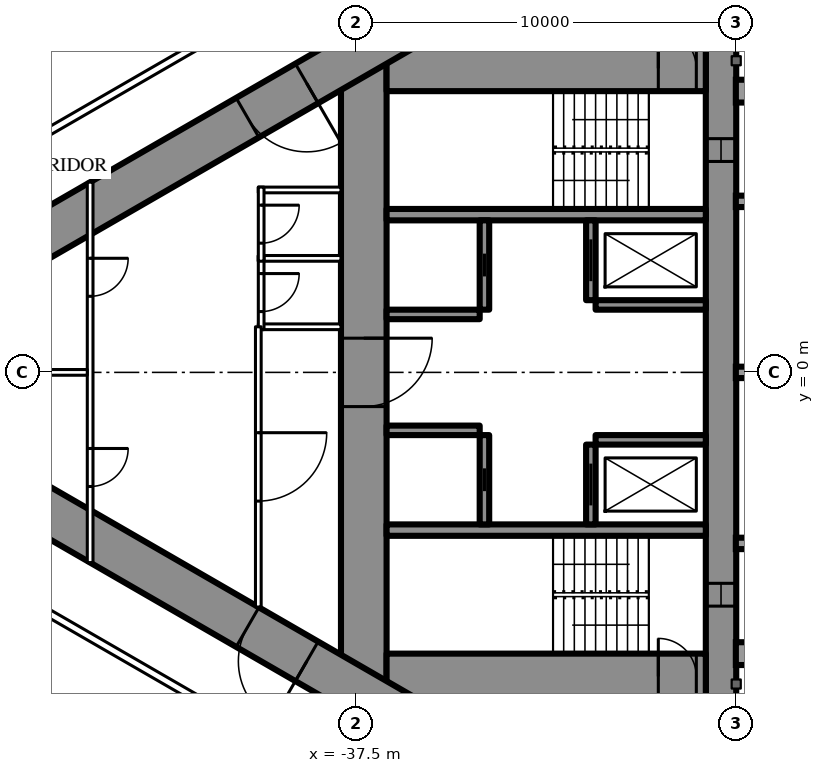
"""IFC4 building model, lengths in metres.
Left out: names, types, materials, properties, quantities, classifications, styles, units other than length and angle.
Written with IfcOpenShell. Run it as: python <this file> out.ifc"""

import sys

from ifc_helpers import new_model, si_unit, direction, frame, frame_2d, origin, place, context, subcontext, project, spatial, rectangle, extrude, element, fill, save


model = new_model("IFC4")
c1 = context("Model", 3, precision=1e-05, world=origin(), true_north=direction((0.0, 1.0)))
c2 = subcontext(c1, "Body", "Model", "MODEL_VIEW")
j1 = project(units=[si_unit("LENGTHUNIT", "METRE"), si_unit("PLANEANGLEUNIT", "RADIAN")], contexts=[c1])
p1 = place(None, origin())
s1 = spatial("IfcSite", under=j1, at=p1, CompositionType="ELEMENT")
p2 = place(p1, origin())
s2 = spatial("IfcBuilding", under=s1, at=p2, CompositionType="ELEMENT")
p3 = place(p2, frame((0.0, 0.0, 70.5)))
s3 = spatial("IfcBuildingStorey", under=s2, at=p3, CompositionType="ELEMENT", Elevation=70.5)
p4 = place(p3, frame((-27.9, 8.6, 0.0), z_axis=(0.0, 0.0, 1.0), x_axis=(0.0, -1.0, 0.0)))
e1 = element("IfcWall", 1, at=p4, inside=s3, PredefinedType="SHEAR", context=c2, shape_type="SweptSolid", body=[
    extrude(rectangle(XDim=17.2, YDim=0.8, at=frame_2d((8.6, 0.0))), origin(), (0.0, 0.0, 1.0), 3.5),
])
p5 = place(p4, frame((2.45, 0.0, 0.6)))
e2 = element("IfcOpeningElement", 2, at=p5, cuts=e1, PredefinedType="OPENING", context=c2, shape_type="SweptSolid", body=[
    extrude(rectangle(XDim=0.6, YDim=2.1, at=frame_2d((0.3, 1.05))), frame((0.0, 0.41, 0.0), z_axis=(0.0, -1.0, 0.0), x_axis=(1.0, 0.0, 0.0)), (0.0, 0.0, 1.0), 0.82),
])
p6 = place(p4, frame((14.15, 0.0, 0.6)))
e3 = element("IfcOpeningElement", 3, at=p6, cuts=e1, PredefinedType="OPENING", context=c2, shape_type="SweptSolid", body=[
    extrude(rectangle(XDim=0.6, YDim=2.1, at=frame_2d((0.3, 1.05))), frame((0.0, 0.41, 0.0), z_axis=(0.0, -1.0, 0.0), x_axis=(1.0, 0.0, 0.0)), (0.0, 0.0, 1.0), 0.82),
])
p7 = place(p3, frame((-37.3, 8.6, 0.0), z_axis=(0.0, 0.0, 1.0), x_axis=(0.0, -1.0, 0.0)))
e4 = element("IfcWall", 4, at=p7, inside=s3, PredefinedType="SHEAR", context=c2, shape_type="SweptSolid", body=[
    extrude(rectangle(XDim=17.2, YDim=1.2, at=frame_2d((8.6, 0.0))), origin(), (0.0, 0.0, 1.0), 3.5),
])
p8 = place(p7, frame((7.7, 0.0, 0.0)))
e5 = element("IfcOpeningElement", 5, at=p8, cuts=e4, PredefinedType="OPENING", context=c2, shape_type="SweptSolid", body=[
    extrude(rectangle(XDim=1.8, YDim=2.2, at=frame_2d((0.9, 1.1))), frame((0.0, 0.61, 0.0), z_axis=(0.0, -1.0, 0.0), x_axis=(1.0, 0.0, 0.0)), (0.0, 0.0, 1.0), 1.22),
])
p9 = place(p3, frame((-28.3, 8.0, 0.0), z_axis=(0.0, 0.0, 1.0), x_axis=(-1.0, 0.0, 0.0)))
e6 = element("IfcWall", 6, at=p9, inside=s3, PredefinedType="SHEAR", context=c2, shape_type="SweptSolid", body=[
    extrude(rectangle(XDim=8.4, YDim=1.2, at=frame_2d((4.2, 0.0))), origin(), (0.0, 0.0, 1.0), 3.5),
])
p10 = place(p9, frame((0.25, 0.0, 0.0)))
e7 = element("IfcOpeningElement", 7, at=p10, cuts=e6, PredefinedType="OPENING", context=c2, shape_type="SweptSolid", body=[
    extrude(rectangle(XDim=1.0, YDim=2.2, at=frame_2d((0.5, 1.1))), frame((0.0, 0.61, 0.0), z_axis=(0.0, -1.0, 0.0), x_axis=(1.0, 0.0, 0.0)), (0.0, 0.0, 1.0), 1.22),
])
p11 = place(p3, frame((-28.3, -8.0, 0.0), z_axis=(0.0, 0.0, 1.0), x_axis=(-1.0, 0.0, 0.0)))
e8 = element("IfcWall", 8, at=p11, inside=s3, PredefinedType="SHEAR", context=c2, shape_type="SweptSolid", body=[
    extrude(rectangle(XDim=8.4, YDim=1.2, at=frame_2d((4.2, 0.0))), origin(), (0.0, 0.0, 1.0), 3.5),
])
p12 = place(p11, frame((0.25, 0.0, 0.0)))
e9 = element("IfcOpeningElement", 9, at=p12, cuts=e8, PredefinedType="OPENING", context=c2, shape_type="SweptSolid", body=[
    extrude(rectangle(XDim=1.0, YDim=2.2, at=frame_2d((0.5, 1.1))), frame((0.0, 0.61, 0.0), z_axis=(0.0, -1.0, 0.0), x_axis=(1.0, 0.0, 0.0)), (0.0, 0.0, 1.0), 1.22),
])
for number, where, z_axis, x_axis in (
    (10, (-28.3, 4.15, 0.0), (0.0, 0.0, 1.0), (-1.0, 0.0, 0.0)),
    (11, (-28.3, -4.15, 0.0), (0.0, 0.0, 1.0), (-1.0, 0.0, 0.0)),
):
    element("IfcWall", number, at=place(p3, frame(where, z_axis=z_axis, x_axis=x_axis)), inside=s3, PredefinedType="SHEAR", context=c2, shape_type="SweptSolid", body=[
        extrude(rectangle(XDim=8.4, YDim=0.3, at=frame_2d((4.2, 0.0))), origin(), (0.0, 0.0, 1.0), 3.5),
    ])
p13 = place(p3, frame((-31.325, 4.0, 0.0), z_axis=(0.0, 0.0, 1.0), x_axis=(0.0, -1.0, 0.0)))
e12 = element("IfcWall", 12, at=p13, inside=s3, PredefinedType="SHEAR", context=c2, shape_type="SweptSolid", body=[
    extrude(rectangle(XDim=2.1, YDim=0.25, at=frame_2d((1.05, 0.0))), origin(), (0.0, 0.0, 1.0), 3.5),
])
p14 = place(p13, frame((0.5, 0.0, 0.0)))
e13 = element("IfcOpeningElement", 13, at=p14, cuts=e12, PredefinedType="OPENING", context=c2, shape_type="SweptSolid", body=[
    extrude(rectangle(XDim=1.1, YDim=2.2, at=frame_2d((0.55, 1.1))), frame((0.0, 0.135, 0.0), z_axis=(0.0, -1.0, 0.0), x_axis=(1.0, 0.0, 0.0)), (0.0, 0.0, 1.0), 0.27),
])
p15 = place(p3, frame((-34.125, 4.0, 0.0), z_axis=(0.0, 0.0, 1.0), x_axis=(0.0, -1.0, 0.0)))
e14 = element("IfcWall", 14, at=p15, inside=s3, PredefinedType="SHEAR", context=c2, shape_type="SweptSolid", body=[
    extrude(rectangle(XDim=2.35, YDim=0.25, at=frame_2d((1.175, 0.0))), origin(), (0.0, 0.0, 1.0), 3.5),
])
p16 = place(p15, frame((0.875, 0.0, 0.0)))
e15 = element("IfcOpeningElement", 15, at=p16, cuts=e14, PredefinedType="OPENING", context=c2, shape_type="SweptSolid", body=[
    extrude(rectangle(XDim=0.6, YDim=2.0, at=frame_2d((0.3, 1.0))), frame((0.0, 0.135, 0.0), z_axis=(0.0, -1.0, 0.0), x_axis=(1.0, 0.0, 0.0)), (0.0, 0.0, 1.0), 0.27),
])
p17 = place(p3, frame((-28.3, 1.775, 0.0), z_axis=(0.0, 0.0, 1.0), x_axis=(-1.0, 0.0, 0.0)))
e16 = element("IfcWall", 16, at=p17, inside=s3, PredefinedType="SHEAR", context=c2, shape_type="SweptSolid", body=[
    extrude(rectangle(XDim=2.9, YDim=0.25, at=frame_2d((1.45, 0.0))), origin(), (0.0, 0.0, 1.0), 3.5),
])
p18 = place(p3, frame((-34.25, 1.525, 0.0), z_axis=(0.0, 0.0, 1.0), x_axis=(-1.0, 0.0, 0.0)))
e17 = element("IfcWall", 17, at=p18, inside=s3, PredefinedType="SHEAR", context=c2, shape_type="SweptSolid", body=[
    extrude(rectangle(XDim=2.45, YDim=0.25, at=frame_2d((1.225, 0.0))), origin(), (0.0, 0.0, 1.0), 3.5),
])
p19 = place(p3, frame((-31.325, -1.9, 0.0), z_axis=(0.0, 0.0, 1.0), x_axis=(0.0, -1.0, 0.0)))
e18 = element("IfcWall", 18, at=p19, inside=s3, PredefinedType="SHEAR", context=c2, shape_type="SweptSolid", body=[
    extrude(rectangle(XDim=2.1, YDim=0.25, at=frame_2d((1.05, 0.0))), origin(), (0.0, 0.0, 1.0), 3.5),
])
p20 = place(p19, frame((0.5, 0.0, 0.0)))
e19 = element("IfcOpeningElement", 19, at=p20, cuts=e18, PredefinedType="OPENING", context=c2, shape_type="SweptSolid", body=[
    extrude(rectangle(XDim=1.1, YDim=2.2, at=frame_2d((0.55, 1.1))), frame((0.0, 0.135, 0.0), z_axis=(0.0, -1.0, 0.0), x_axis=(1.0, 0.0, 0.0)), (0.0, 0.0, 1.0), 0.27),
])
p21 = place(p3, frame((-34.125, -1.65, 0.0), z_axis=(0.0, 0.0, 1.0), x_axis=(0.0, -1.0, 0.0)))
e20 = element("IfcWall", 20, at=p21, inside=s3, PredefinedType="SHEAR", context=c2, shape_type="SweptSolid", body=[
    extrude(rectangle(XDim=2.35, YDim=0.25, at=frame_2d((1.175, 0.0))), origin(), (0.0, 0.0, 1.0), 3.5),
])
p22 = place(p21, frame((0.875, 0.0, 0.0)))
e21 = element("IfcOpeningElement", 21, at=p22, cuts=e20, PredefinedType="OPENING", context=c2, shape_type="SweptSolid", body=[
    extrude(rectangle(XDim=0.6, YDim=2.0, at=frame_2d((0.3, 1.0))), frame((0.0, 0.135, 0.0), z_axis=(0.0, -1.0, 0.0), x_axis=(1.0, 0.0, 0.0)), (0.0, 0.0, 1.0), 0.27),
])
p23 = place(p3, frame((-28.3, -1.775, 0.0), z_axis=(0.0, 0.0, 1.0), x_axis=(-1.0, 0.0, 0.0)))
e22 = element("IfcWall", 22, at=p23, inside=s3, PredefinedType="SHEAR", context=c2, shape_type="SweptSolid", body=[
    extrude(rectangle(XDim=2.9, YDim=0.25, at=frame_2d((1.45, 0.0))), origin(), (0.0, 0.0, 1.0), 3.5),
])
p24 = place(p3, frame((-34.25, -1.525, 0.0), z_axis=(0.0, 0.0, 1.0), x_axis=(-1.0, 0.0, 0.0)))
e23 = element("IfcWall", 23, at=p24, inside=s3, PredefinedType="SHEAR", context=c2, shape_type="SweptSolid", body=[
    extrude(rectangle(XDim=2.45, YDim=0.25, at=frame_2d((1.225, 0.0))), origin(), (0.0, 0.0, 1.0), 3.5),
])
p25 = place(p3, frame((-27.2, 14.3, 0.0), z_axis=(0.0, 0.0, 1.0), x_axis=(-0.866026593062, -0.499997940104, 0.0)))
e24 = element("IfcWall", 24, at=p25, inside=s3, PredefinedType="SHEAR", context=c2, shape_type="SweptSolid", body=[
    extrude(rectangle(XDim=28.946, YDim=1.2, at=frame_2d((14.473, 0.0))), origin(), (0.0, 0.0, 1.0), 3.5),
])
p26 = place(p25, frame((4.6, 0.0, 0.0)))
e25 = element("IfcOpeningElement", 25, at=p26, cuts=e24, PredefinedType="OPENING", context=c2, shape_type="SweptSolid", body=[
    extrude(rectangle(XDim=1.0, YDim=2.2, at=frame_2d((0.5, 1.1))), frame((0.0, 0.61, 0.0), z_axis=(0.0, -1.0, 0.0), x_axis=(1.0, 0.0, 0.0)), (0.0, 0.0, 1.0), 1.22),
])
p27 = place(p25, frame((13.395, 0.0, 0.0)))
e26 = element("IfcOpeningElement", 26, at=p27, cuts=e24, PredefinedType="OPENING", context=c2, shape_type="SweptSolid", body=[
    extrude(rectangle(XDim=1.8, YDim=2.2, at=frame_2d((0.9, 1.1))), frame((0.0, 0.61, 0.0), z_axis=(0.0, -1.0, 0.0), x_axis=(1.0, 0.0, 0.0)), (0.0, 0.0, 1.0), 1.22),
])
p28 = place(p3, frame((-27.2, -14.3, 0.0), z_axis=(0.0, 0.0, 1.0), x_axis=(-0.866024021859, 0.500002393557, 0.0)))
e27 = element("IfcWall", 27, at=p28, inside=s3, PredefinedType="SHEAR", context=c2, shape_type="SweptSolid", body=[
    extrude(rectangle(XDim=27.907, YDim=1.2, at=frame_2d((13.954, 0.0))), origin(), (0.0, 0.0, 1.0), 3.5),
])
p29 = place(p28, frame((4.6, 0.0, 0.0)))
e28 = element("IfcOpeningElement", 28, at=p29, cuts=e27, PredefinedType="OPENING", context=c2, shape_type="SweptSolid", body=[
    extrude(rectangle(XDim=1.0, YDim=2.2, at=frame_2d((0.5, 1.1))), frame((0.0, 0.61, 0.0), z_axis=(0.0, -1.0, 0.0), x_axis=(1.0, 0.0, 0.0)), (0.0, 0.0, 1.0), 1.22),
])
p30 = place(p28, frame((13.395, 0.0, 0.0)))
e29 = element("IfcOpeningElement", 29, at=p30, cuts=e27, PredefinedType="OPENING", context=c2, shape_type="SweptSolid", body=[
    extrude(rectangle(XDim=1.8, YDim=2.2, at=frame_2d((0.9, 1.1))), frame((0.0, 0.61, 0.0), z_axis=(0.0, -1.0, 0.0), x_axis=(1.0, 0.0, 0.0)), (0.0, 0.0, 1.0), 1.22),
])
p31 = place(p3, frame((-36.92, -11.344, 0.0), z_axis=(0.0, 0.0, 1.0), x_axis=(-0.866028313256, 0.499994960614, 0.0)))
e30 = element("IfcWall", 30, at=p31, inside=s3, PredefinedType="PARTITIONING", context=c2, shape_type="SweptSolid", body=[
    extrude(rectangle(XDim=22.568, YDim=0.2, at=frame_2d((11.284, 0.0))), origin(), (0.0, 0.0, 1.0), 3.25),
])
p32 = place(p31, frame((20.958, 0.0, 0.0)))
e31 = element("IfcOpeningElement", 31, at=p32, cuts=e30, PredefinedType="OPENING", context=c2, shape_type="SweptSolid", body=[
    extrude(rectangle(XDim=0.95, YDim=2.2, at=frame_2d((0.475, 1.1))), frame((0.0, 0.11, 0.0), z_axis=(0.0, -1.0, 0.0), x_axis=(1.0, 0.0, 0.0)), (0.0, 0.0, 1.0), 0.22),
])
p33 = place(p31, frame((12.68, 0.0, 0.0)))
e32 = element("IfcOpeningElement", 32, at=p33, cuts=e30, PredefinedType="OPENING", context=c2, shape_type="SweptSolid", body=[
    extrude(rectangle(XDim=0.95, YDim=2.2, at=frame_2d((0.475, 1.1))), frame((0.0, 0.11, 0.0), z_axis=(0.0, -1.0, 0.0), x_axis=(1.0, 0.0, 0.0)), (0.0, 0.0, 1.0), 0.22),
])
p34 = place(p31, frame((3.35, 0.0, 0.0)))
e33 = element("IfcOpeningElement", 33, at=p34, cuts=e30, PredefinedType="OPENING", context=c2, shape_type="SweptSolid", body=[
    extrude(rectangle(XDim=1.0, YDim=2.2, at=frame_2d((0.5, 1.1))), frame((0.0, 0.11, 0.0), z_axis=(0.0, -1.0, 0.0), x_axis=(1.0, 0.0, 0.0)), (0.0, 0.0, 1.0), 0.22),
])
p35 = place(p3, frame((-37.7, 10.894, 0.0), z_axis=(0.0, 0.0, 1.0), x_axis=(-0.866024459167, -0.500001636122, 0.0)))
e34 = element("IfcWall", 34, at=p35, inside=s3, PredefinedType="PARTITIONING", context=c2, shape_type="SweptSolid", body=[
    extrude(rectangle(XDim=11.38, YDim=0.2, at=frame_2d((5.69, 0.0))), origin(), (0.0, 0.0, 1.0), 3.25),
])
p36 = place(p35, frame((0.6, 0.0, 0.0)))
e35 = element("IfcOpeningElement", 35, at=p36, cuts=e34, PredefinedType="OPENING", context=c2, shape_type="SweptSolid", body=[
    extrude(rectangle(XDim=0.95, YDim=2.2, at=frame_2d((0.475, 1.1))), frame((0.0, 0.11, 0.0), z_axis=(0.0, -1.0, 0.0), x_axis=(1.0, 0.0, 0.0)), (0.0, 0.0, 1.0), 0.22),
])
for number, where, z_axis, x_axis in (
    (36, (-37.9, 1.2, 0.0), (0.0, 0.0, 1.0), (-1.0, 0.0, 0.0)),
    (37, (-37.9, 3.0, 0.0), (0.0, 0.0, 1.0), (-1.0, 0.0, 0.0)),
    (38, (-37.9, 4.8, 0.0), (0.0, 0.0, 1.0), (-1.0, 0.0, 0.0)),
):
    element("IfcWall", number, at=place(p3, frame(where, z_axis=z_axis, x_axis=x_axis)), inside=s3, PredefinedType="PARTITIONING", context=c2, shape_type="SweptSolid", body=[
        extrude(rectangle(XDim=2.175, YDim=0.15, at=frame_2d((1.087, 0.0))), origin(), (0.0, 0.0, 1.0), 3.25),
    ])
p37 = place(p3, frame((-40.0, 3.075, 0.0), z_axis=(0.0, 0.0, 1.0), x_axis=(0.0, -1.0, 0.0)))
e39 = element("IfcWall", 39, at=p37, inside=s3, PredefinedType="PARTITIONING", context=c2, shape_type="SweptSolid", body=[
    extrude(rectangle(XDim=1.95, YDim=0.15, at=frame_2d((0.975, 0.0))), origin(), (0.0, 0.0, 1.0), 3.25),
])
p38 = place(p37, frame((0.475, 0.0, 0.0)))
e40 = element("IfcOpeningElement", 40, at=p38, cuts=e39, PredefinedType="OPENING", context=c2, shape_type="SweptSolid", body=[
    extrude(rectangle(XDim=1.0, YDim=2.2, at=frame_2d((0.5, 1.1))), frame((0.0, 0.085, 0.0), z_axis=(0.0, -1.0, 0.0), x_axis=(1.0, 0.0, 0.0)), (0.0, 0.0, 1.0), 0.17),
])
p39 = place(p3, frame((-40.0, 4.875, 0.0), z_axis=(0.0, 0.0, 1.0), x_axis=(0.0, -1.0, 0.0)))
e41 = element("IfcWall", 41, at=p39, inside=s3, PredefinedType="PARTITIONING", context=c2, shape_type="SweptSolid", body=[
    extrude(rectangle(XDim=1.95, YDim=0.15, at=frame_2d((0.975, 0.0))), origin(), (0.0, 0.0, 1.0), 3.25),
])
p40 = place(p39, frame((0.475, 0.0, 0.0)))
e42 = element("IfcOpeningElement", 42, at=p40, cuts=e41, PredefinedType="OPENING", context=c2, shape_type="SweptSolid", body=[
    extrude(rectangle(XDim=1.0, YDim=2.2, at=frame_2d((0.5, 1.1))), frame((0.0, 0.085, 0.0), z_axis=(0.0, -1.0, 0.0), x_axis=(1.0, 0.0, 0.0)), (0.0, 0.0, 1.0), 0.17),
])
p41 = place(p3, frame((-40.075, 1.2, 0.0), z_axis=(0.0, 0.0, 1.0), x_axis=(0.0, -1.0, 0.0)))
e43 = element("IfcWall", 43, at=p41, inside=s3, PredefinedType="PARTITIONING", context=c2, shape_type="SweptSolid", body=[
    extrude(rectangle(XDim=7.374, YDim=0.15, at=frame_2d((3.687, 0.0))), origin(), (0.0, 0.0, 1.0), 3.25),
])
p42 = place(p41, frame((2.787, 0.0, 0.0)))
e44 = element("IfcOpeningElement", 44, at=p42, cuts=e43, PredefinedType="OPENING", context=c2, shape_type="SweptSolid", body=[
    extrude(rectangle(XDim=1.8, YDim=2.2, at=frame_2d((0.9, 1.1))), frame((0.0, 0.085, 0.0), z_axis=(0.0, -1.0, 0.0), x_axis=(1.0, 0.0, 0.0)), (0.0, 0.0, 1.0), 0.17),
])
p43 = place(p3, frame((-44.5, 5.005, 0.0), z_axis=(0.0, 0.0, 1.0), x_axis=(0.0, -1.0, 0.0)))
e45 = element("IfcWall", 45, at=p43, inside=s3, PredefinedType="PARTITIONING", context=c2, shape_type="SweptSolid", body=[
    extrude(rectangle(XDim=10.009, YDim=0.15, at=frame_2d((5.005, 0.0))), origin(), (0.0, 0.0, 1.0), 2.45),
])
p44 = place(p43, frame((2.002, 0.0, 0.0)))
e46 = element("IfcOpeningElement", 46, at=p44, cuts=e45, PredefinedType="OPENING", context=c2, shape_type="SweptSolid", body=[
    extrude(rectangle(XDim=1.0, YDim=2.2, at=frame_2d((0.5, 1.1))), frame((0.0, 0.085, 0.0), z_axis=(0.0, -1.0, 0.0), x_axis=(1.0, 0.0, 0.0)), (0.0, 0.0, 1.0), 0.17),
])
p45 = place(p43, frame((7.007, 0.0, 0.0)))
e47 = element("IfcOpeningElement", 47, at=p45, cuts=e45, PredefinedType="OPENING", context=c2, shape_type="SweptSolid", body=[
    extrude(rectangle(XDim=1.0, YDim=2.2, at=frame_2d((0.5, 1.1))), frame((0.0, 0.085, 0.0), z_axis=(0.0, -1.0, 0.0), x_axis=(1.0, 0.0, 0.0)), (0.0, 0.0, 1.0), 0.17),
])
p46 = place(p3, frame((-44.575, 0.0, 0.0), z_axis=(0.0, 0.0, 1.0), x_axis=(-1.0, 0.0, 0.0)))
e48 = element("IfcWall", 48, at=p46, inside=s3, PredefinedType="PARTITIONING", context=c2, shape_type="SweptSolid", body=[
    extrude(rectangle(XDim=8.593, YDim=0.15, at=frame_2d((4.297, 0.0))), origin(), (0.0, 0.0, 1.0), 2.25),
])
p47 = place(p38, origin())
e49 = element("IfcDoor", 49, at=p47, inside=s3, OperationType="SINGLE_SWING_LEFT", PredefinedType="DOOR", context=c2, shape_type="SweptSolid", body=[
    extrude(rectangle(XDim=1.0, YDim=2.2, at=frame_2d((0.5, 1.1))), frame((0.0, 0.025, 0.0), z_axis=(0.0, -1.0, 0.0), x_axis=(1.0, 0.0, 0.0)), (0.0, 0.0, 1.0), 0.05),
])
fill(e40, e49)
p48 = place(p40, origin())
e50 = element("IfcDoor", 50, at=p48, inside=s3, OperationType="SINGLE_SWING_LEFT", PredefinedType="DOOR", context=c2, shape_type="SweptSolid", body=[
    extrude(rectangle(XDim=1.0, YDim=2.2, at=frame_2d((0.5, 1.1))), frame((0.0, 0.025, 0.0), z_axis=(0.0, -1.0, 0.0), x_axis=(1.0, 0.0, 0.0)), (0.0, 0.0, 1.0), 0.05),
])
fill(e42, e50)
p49 = place(p42, origin())
e51 = element("IfcDoor", 51, at=p49, inside=s3, OperationType="DOUBLE_DOOR_SINGLE_SWING", PredefinedType="DOOR", context=c2, shape_type="SweptSolid", body=[
    extrude(rectangle(XDim=1.8, YDim=2.2, at=frame_2d((0.9, 1.1))), frame((0.0, 0.025, 0.0), z_axis=(0.0, -1.0, 0.0), x_axis=(1.0, 0.0, 0.0)), (0.0, 0.0, 1.0), 0.05),
])
fill(e44, e51)
p50 = place(p44, origin())
e52 = element("IfcDoor", 52, at=p50, inside=s3, OperationType="SINGLE_SWING_LEFT", PredefinedType="DOOR", context=c2, shape_type="SweptSolid", body=[
    extrude(rectangle(XDim=1.0, YDim=2.2, at=frame_2d((0.5, 1.1))), frame((0.0, 0.025, 0.0), z_axis=(0.0, -1.0, 0.0), x_axis=(1.0, 0.0, 0.0)), (0.0, 0.0, 1.0), 0.05),
])
fill(e46, e52)
p51 = place(p45, origin())
e53 = element("IfcDoor", 53, at=p51, inside=s3, OperationType="SINGLE_SWING_LEFT", PredefinedType="DOOR", context=c2, shape_type="SweptSolid", body=[
    extrude(rectangle(XDim=1.0, YDim=2.2, at=frame_2d((0.5, 1.1))), frame((0.0, 0.025, 0.0), z_axis=(0.0, -1.0, 0.0), x_axis=(1.0, 0.0, 0.0)), (0.0, 0.0, 1.0), 0.05),
])
fill(e47, e53)
p52 = place(p27, origin())
e54 = element("IfcDoor", 54, at=p52, inside=s3, OperationType="DOUBLE_DOOR_SINGLE_SWING", PredefinedType="DOOR", context=c2, shape_type="SweptSolid", body=[
    extrude(rectangle(XDim=1.8, YDim=2.2, at=frame_2d((0.9, 1.1))), frame((0.0, 0.025, 0.0), z_axis=(0.0, -1.0, 0.0), x_axis=(1.0, 0.0, 0.0)), (0.0, 0.0, 1.0), 0.05),
])
fill(e26, e54)
p53 = place(p30, origin())
e55 = element("IfcDoor", 55, at=p53, inside=s3, OperationType="DOUBLE_DOOR_SINGLE_SWING", PredefinedType="DOOR", context=c2, shape_type="SweptSolid", body=[
    extrude(rectangle(XDim=1.8, YDim=2.2, at=frame_2d((0.9, 1.1))), frame((0.0, 0.025, 0.0), z_axis=(0.0, -1.0, 0.0), x_axis=(1.0, 0.0, 0.0)), (0.0, 0.0, 1.0), 0.05),
])
fill(e29, e55)
p54 = place(p8, origin())
e56 = element("IfcDoor", 56, at=p54, inside=s3, OperationType="DOUBLE_DOOR_SINGLE_SWING", PredefinedType="DOOR", context=c2, shape_type="SweptSolid", body=[
    extrude(rectangle(XDim=1.8, YDim=2.2, at=frame_2d((0.9, 1.1))), frame((0.0, 0.025, 0.0), z_axis=(0.0, -1.0, 0.0), x_axis=(1.0, 0.0, 0.0)), (0.0, 0.0, 1.0), 0.05),
])
fill(e5, e56)
p55 = place(p10, origin())
e57 = element("IfcDoor", 57, at=p55, inside=s3, OperationType="SINGLE_SWING_RIGHT", PredefinedType="DOOR", context=c2, shape_type="SweptSolid", body=[
    extrude(rectangle(XDim=1.0, YDim=2.2, at=frame_2d((0.5, 1.1))), frame((0.0, 0.025, 0.0), z_axis=(0.0, -1.0, 0.0), x_axis=(1.0, 0.0, 0.0)), (0.0, 0.0, 1.0), 0.05),
])
fill(e7, e57)
p56 = place(p12, origin())
e58 = element("IfcDoor", 58, at=p56, inside=s3, OperationType="SINGLE_SWING_RIGHT", PredefinedType="DOOR", context=c2, shape_type="SweptSolid", body=[
    extrude(rectangle(XDim=1.0, YDim=2.2, at=frame_2d((0.5, 1.1))), frame((0.0, 0.025, 0.0), z_axis=(0.0, -1.0, 0.0), x_axis=(1.0, 0.0, 0.0)), (0.0, 0.0, 1.0), 0.05),
])
fill(e9, e58)
p57 = place(p14, origin())
e59 = element("IfcDoor", 59, at=p57, inside=s3, OperationType="SLIDING_TO_LEFT", PredefinedType="USERDEFINED", context=c2, shape_type="SweptSolid", body=[
    extrude(rectangle(XDim=1.1, YDim=2.2, at=frame_2d((0.55, 1.1))), frame((0.0, 0.025, 0.0), z_axis=(0.0, -1.0, 0.0), x_axis=(1.0, 0.0, 0.0)), (0.0, 0.0, 1.0), 0.05),
])
fill(e13, e59)
p58 = place(p20, origin())
e60 = element("IfcDoor", 60, at=p58, inside=s3, OperationType="SLIDING_TO_LEFT", PredefinedType="USERDEFINED", context=c2, shape_type="SweptSolid", body=[
    extrude(rectangle(XDim=1.1, YDim=2.2, at=frame_2d((0.55, 1.1))), frame((0.0, 0.025, 0.0), z_axis=(0.0, -1.0, 0.0), x_axis=(1.0, 0.0, 0.0)), (0.0, 0.0, 1.0), 0.05),
])
fill(e19, e60)
p59 = place(p16, origin())
e61 = element("IfcDoor", 61, at=p59, inside=s3, OperationType="SLIDING_TO_LEFT", PredefinedType="DOOR", context=c2, shape_type="SweptSolid", body=[
    extrude(rectangle(XDim=0.6, YDim=2.0, at=frame_2d((0.3, 1.0))), frame((0.0, 0.025, 0.0), z_axis=(0.0, -1.0, 0.0), x_axis=(1.0, 0.0, 0.0)), (0.0, 0.0, 1.0), 0.05),
])
fill(e15, e61)
p60 = place(p22, origin())
e62 = element("IfcDoor", 62, at=p60, inside=s3, OperationType="SLIDING_TO_LEFT", PredefinedType="DOOR", context=c2, shape_type="SweptSolid", body=[
    extrude(rectangle(XDim=0.6, YDim=2.0, at=frame_2d((0.3, 1.0))), frame((0.0, 0.025, 0.0), z_axis=(0.0, -1.0, 0.0), x_axis=(1.0, 0.0, 0.0)), (0.0, 0.0, 1.0), 0.05),
])
fill(e21, e62)
p61 = place(p5, origin())
e63 = element("IfcWindow", 63, at=p61, inside=s3, PartitioningType="SINGLE_PANEL", PredefinedType="WINDOW", context=c2, shape_type="SweptSolid", body=[
    extrude(rectangle(XDim=0.6, YDim=2.1, at=frame_2d((0.3, 1.05))), frame((0.0, 0.03, 0.0), z_axis=(0.0, -1.0, 0.0), x_axis=(1.0, 0.0, 0.0)), (0.0, 0.0, 1.0), 0.06),
])
fill(e2, e63)
p62 = place(p6, origin())
e64 = element("IfcWindow", 64, at=p62, inside=s3, PartitioningType="SINGLE_PANEL", PredefinedType="WINDOW", context=c2, shape_type="SweptSolid", body=[
    extrude(rectangle(XDim=0.6, YDim=2.1, at=frame_2d((0.3, 1.05))), frame((0.0, 0.03, 0.0), z_axis=(0.0, -1.0, 0.0), x_axis=(1.0, 0.0, 0.0)), (0.0, 0.0, 1.0), 0.06),
])
fill(e3, e64)
save(model, sys.argv[1])
